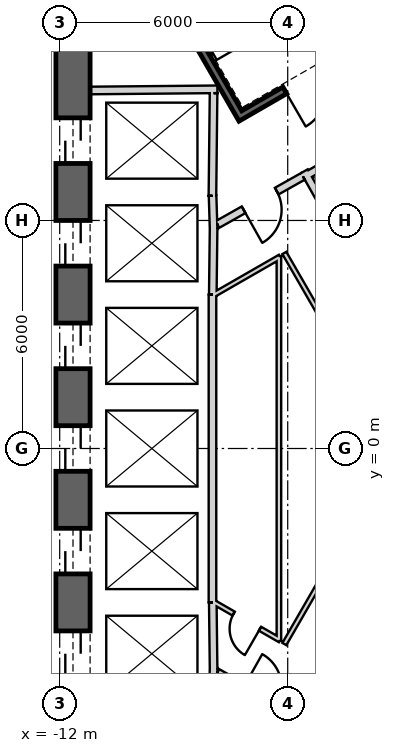
"""IFC4 building model, lengths in metres.
Left out: names, types, materials, properties, quantities, classifications, styles, units other than length and angle.
Written with IfcOpenShell. Run it as: python <this file> out.ifc"""

import sys

from ifc_helpers import new_model, si_unit, direction, frame, frame_2d, origin, place, context, subcontext, project, spatial, rectangle, extrude, element, fill, save


model = new_model("IFC4")
c1 = context("Model", 3, precision=1e-05, world=origin(), true_north=direction((0.0, 1.0)))
c2 = subcontext(c1, "Body", "Model", "MODEL_VIEW")
j1 = project(units=[si_unit("LENGTHUNIT", "METRE"), si_unit("PLANEANGLEUNIT", "RADIAN")], contexts=[c1])
p1 = place(None, origin())
s1 = spatial("IfcSite", under=j1, at=p1, CompositionType="ELEMENT")
p2 = place(p1, origin())
s2 = spatial("IfcBuilding", under=s1, at=p2, CompositionType="ELEMENT")
p3 = place(p2, frame((0.0, 0.0, 82.4)))
s3 = spatial("IfcBuildingStorey", under=s2, at=p3, CompositionType="ELEMENT", Elevation=82.4)
p4 = place(p3, frame((19.475, 2.208, 0.0), z_axis=(0.0, 0.0, 1.0), x_axis=(-0.866028369851, 0.499994862586, 0.0)))
e1 = element("IfcWall", 1, at=p4, inside=s3, PredefinedType="SHEAR", context=c2, shape_type="SweptSolid", body=[
    extrude(rectangle(XDim=31.523, YDim=0.9, at=frame_2d((15.762, 0.0))), origin(), (0.0, 0.0, 1.0), 4.1),
])
p5 = place(p4, frame((7.062, 0.0, 0.0)))
e2 = element("IfcOpeningElement", 2, at=p5, cuts=e1, PredefinedType="OPENING", context=c2, shape_type="SweptSolid", body=[
    extrude(rectangle(XDim=1.2, YDim=2.4, at=frame_2d((0.6, 1.2))), frame((0.0, 0.46, 0.0), z_axis=(0.0, -1.0, 0.0), x_axis=(1.0, 0.0, 0.0)), (0.0, 0.0, 1.0), 0.92),
])
p6 = place(p4, frame((9.762, 0.0, 0.0)))
e3 = element("IfcOpeningElement", 3, at=p6, cuts=e1, PredefinedType="OPENING", context=c2, shape_type="SweptSolid", body=[
    extrude(rectangle(XDim=1.2, YDim=2.4, at=frame_2d((0.6, 1.2))), frame((0.0, 0.46, 0.0), z_axis=(0.0, -1.0, 0.0), x_axis=(1.0, 0.0, 0.0)), (0.0, 0.0, 1.0), 0.92),
])
p7 = place(p4, frame((12.462, 0.0, 0.0)))
e4 = element("IfcOpeningElement", 4, at=p7, cuts=e1, PredefinedType="OPENING", context=c2, shape_type="SweptSolid", body=[
    extrude(rectangle(XDim=1.2, YDim=2.4, at=frame_2d((0.6, 1.2))), frame((0.0, 0.46, 0.0), z_axis=(0.0, -1.0, 0.0), x_axis=(1.0, 0.0, 0.0)), (0.0, 0.0, 1.0), 0.92),
])
p8 = place(p4, frame((15.162, 0.0, 0.0)))
e5 = element("IfcOpeningElement", 5, at=p8, cuts=e1, PredefinedType="OPENING", context=c2, shape_type="SweptSolid", body=[
    extrude(rectangle(XDim=1.2, YDim=2.4, at=frame_2d((0.6, 1.2))), frame((0.0, 0.46, 0.0), z_axis=(0.0, -1.0, 0.0), x_axis=(1.0, 0.0, 0.0)), (0.0, 0.0, 1.0), 0.92),
])
p9 = place(p4, frame((17.862, 0.0, 0.0)))
e6 = element("IfcOpeningElement", 6, at=p9, cuts=e1, PredefinedType="OPENING", context=c2, shape_type="SweptSolid", body=[
    extrude(rectangle(XDim=1.2, YDim=2.4, at=frame_2d((0.6, 1.2))), frame((0.0, 0.46, 0.0), z_axis=(0.0, -1.0, 0.0), x_axis=(1.0, 0.0, 0.0)), (0.0, 0.0, 1.0), 0.92),
])
p10 = place(p4, frame((20.562, 0.0, 0.0)))
e7 = element("IfcOpeningElement", 7, at=p10, cuts=e1, PredefinedType="OPENING", context=c2, shape_type="SweptSolid", body=[
    extrude(rectangle(XDim=1.2, YDim=2.4, at=frame_2d((0.6, 1.2))), frame((0.0, 0.46, 0.0), z_axis=(0.0, -1.0, 0.0), x_axis=(1.0, 0.0, 0.0)), (0.0, 0.0, 1.0), 0.92),
])
p11 = place(p4, frame((23.262, 0.0, 0.0)))
e8 = element("IfcOpeningElement", 8, at=p11, cuts=e1, PredefinedType="OPENING", context=c2, shape_type="SweptSolid", body=[
    extrude(rectangle(XDim=1.2, YDim=2.4, at=frame_2d((0.6, 1.2))), frame((0.0, 0.46, 0.0), z_axis=(0.0, -1.0, 0.0), x_axis=(1.0, 0.0, 0.0)), (0.0, 0.0, 1.0), 0.92),
])
p12 = place(p4, frame((3.612, 0.0, 0.0)))
e9 = element("IfcOpeningElement", 9, at=p12, cuts=e1, PredefinedType="OPENING", context=c2, shape_type="SweptSolid", body=[
    extrude(rectangle(XDim=1.2, YDim=2.4, at=frame_2d((0.6, 1.2))), frame((0.0, 0.46, 0.0), z_axis=(0.0, -1.0, 0.0), x_axis=(1.0, 0.0, 0.0)), (0.0, 0.0, 1.0), 0.92),
])
p13 = place(p4, frame((26.712, 0.0, 0.0)))
e10 = element("IfcOpeningElement", 10, at=p13, cuts=e1, PredefinedType="OPENING", context=c2, shape_type="SweptSolid", body=[
    extrude(rectangle(XDim=1.2, YDim=2.4, at=frame_2d((0.6, 1.2))), frame((0.0, 0.46, 0.0), z_axis=(0.0, -1.0, 0.0), x_axis=(1.0, 0.0, 0.0)), (0.0, 0.0, 1.0), 0.92),
])
p14 = place(p3, frame((-11.65, 15.762, 0.0), z_axis=(0.0, 0.0, 1.0), x_axis=(0.0, -1.0, 0.0)))
e11 = element("IfcWall", 11, at=p14, inside=s3, PredefinedType="SHEAR", context=c2, shape_type="SweptSolid", body=[
    extrude(rectangle(XDim=31.523, YDim=0.9, at=frame_2d((15.762, 0.0))), origin(), (0.0, 0.0, 1.0), 4.1),
])
p15 = place(p14, frame((7.062, 0.0, 0.0)))
e12 = element("IfcOpeningElement", 12, at=p15, cuts=e11, PredefinedType="OPENING", context=c2, shape_type="SweptSolid", body=[
    extrude(rectangle(XDim=1.2, YDim=2.4, at=frame_2d((0.6, 1.2))), frame((0.0, 0.46, 0.0), z_axis=(0.0, -1.0, 0.0), x_axis=(1.0, 0.0, 0.0)), (0.0, 0.0, 1.0), 0.92),
])
p16 = place(p14, frame((9.762, 0.0, 0.0)))
e13 = element("IfcOpeningElement", 13, at=p16, cuts=e11, PredefinedType="OPENING", context=c2, shape_type="SweptSolid", body=[
    extrude(rectangle(XDim=1.2, YDim=2.4, at=frame_2d((0.6, 1.2))), frame((0.0, 0.46, 0.0), z_axis=(0.0, -1.0, 0.0), x_axis=(1.0, 0.0, 0.0)), (0.0, 0.0, 1.0), 0.92),
])
p17 = place(p14, frame((12.462, 0.0, 0.0)))
e14 = element("IfcOpeningElement", 14, at=p17, cuts=e11, PredefinedType="OPENING", context=c2, shape_type="SweptSolid", body=[
    extrude(rectangle(XDim=1.2, YDim=2.4, at=frame_2d((0.6, 1.2))), frame((0.0, 0.46, 0.0), z_axis=(0.0, -1.0, 0.0), x_axis=(1.0, 0.0, 0.0)), (0.0, 0.0, 1.0), 0.92),
])
p18 = place(p14, frame((15.162, 0.0, 0.0)))
e15 = element("IfcOpeningElement", 15, at=p18, cuts=e11, PredefinedType="OPENING", context=c2, shape_type="SweptSolid", body=[
    extrude(rectangle(XDim=1.2, YDim=2.4, at=frame_2d((0.6, 1.2))), frame((0.0, 0.46, 0.0), z_axis=(0.0, -1.0, 0.0), x_axis=(1.0, 0.0, 0.0)), (0.0, 0.0, 1.0), 0.92),
])
p19 = place(p14, frame((17.862, 0.0, 0.0)))
e16 = element("IfcOpeningElement", 16, at=p19, cuts=e11, PredefinedType="OPENING", context=c2, shape_type="SweptSolid", body=[
    extrude(rectangle(XDim=1.2, YDim=2.4, at=frame_2d((0.6, 1.2))), frame((0.0, 0.46, 0.0), z_axis=(0.0, -1.0, 0.0), x_axis=(1.0, 0.0, 0.0)), (0.0, 0.0, 1.0), 0.92),
])
p20 = place(p14, frame((20.562, 0.0, 0.0)))
e17 = element("IfcOpeningElement", 17, at=p20, cuts=e11, PredefinedType="OPENING", context=c2, shape_type="SweptSolid", body=[
    extrude(rectangle(XDim=1.2, YDim=2.4, at=frame_2d((0.6, 1.2))), frame((0.0, 0.46, 0.0), z_axis=(0.0, -1.0, 0.0), x_axis=(1.0, 0.0, 0.0)), (0.0, 0.0, 1.0), 0.92),
])
p21 = place(p14, frame((23.262, 0.0, 0.0)))
e18 = element("IfcOpeningElement", 18, at=p21, cuts=e11, PredefinedType="OPENING", context=c2, shape_type="SweptSolid", body=[
    extrude(rectangle(XDim=1.2, YDim=2.4, at=frame_2d((0.6, 1.2))), frame((0.0, 0.46, 0.0), z_axis=(0.0, -1.0, 0.0), x_axis=(1.0, 0.0, 0.0)), (0.0, 0.0, 1.0), 0.92),
])
p22 = place(p14, frame((3.612, 0.0, 0.0)))
e19 = element("IfcOpeningElement", 19, at=p22, cuts=e11, PredefinedType="OPENING", context=c2, shape_type="SweptSolid", body=[
    extrude(rectangle(XDim=1.2, YDim=2.4, at=frame_2d((0.6, 1.2))), frame((0.0, 0.46, 0.0), z_axis=(0.0, -1.0, 0.0), x_axis=(1.0, 0.0, 0.0)), (0.0, 0.0, 1.0), 0.92),
])
p23 = place(p14, frame((26.712, 0.0, 0.0)))
e20 = element("IfcOpeningElement", 20, at=p23, cuts=e11, PredefinedType="OPENING", context=c2, shape_type="SweptSolid", body=[
    extrude(rectangle(XDim=1.2, YDim=2.4, at=frame_2d((0.6, 1.2))), frame((0.0, 0.46, 0.0), z_axis=(0.0, -1.0, 0.0), x_axis=(1.0, 0.0, 0.0)), (0.0, 0.0, 1.0), 0.92),
])
p24 = place(p3, frame((-7.825, -17.97, 0.0), z_axis=(0.0, 0.0, 1.0), x_axis=(0.866028369851, 0.499994862586, 0.0)))
e21 = element("IfcWall", 21, at=p24, inside=s3, PredefinedType="SHEAR", context=c2, shape_type="SweptSolid", body=[
    extrude(rectangle(XDim=31.523, YDim=0.9, at=frame_2d((15.762, 0.0))), origin(), (0.0, 0.0, 1.0), 4.1),
])
p25 = place(p24, frame((7.062, 0.0, 0.0)))
e22 = element("IfcOpeningElement", 22, at=p25, cuts=e21, PredefinedType="OPENING", context=c2, shape_type="SweptSolid", body=[
    extrude(rectangle(XDim=1.2, YDim=2.4, at=frame_2d((0.6, 1.2))), frame((0.0, 0.46, 0.0), z_axis=(0.0, -1.0, 0.0), x_axis=(1.0, 0.0, 0.0)), (0.0, 0.0, 1.0), 0.92),
])
p26 = place(p24, frame((9.762, 0.0, 0.0)))
e23 = element("IfcOpeningElement", 23, at=p26, cuts=e21, PredefinedType="OPENING", context=c2, shape_type="SweptSolid", body=[
    extrude(rectangle(XDim=1.2, YDim=2.4, at=frame_2d((0.6, 1.2))), frame((0.0, 0.46, 0.0), z_axis=(0.0, -1.0, 0.0), x_axis=(1.0, 0.0, 0.0)), (0.0, 0.0, 1.0), 0.92),
])
p27 = place(p24, frame((12.462, 0.0, 0.0)))
e24 = element("IfcOpeningElement", 24, at=p27, cuts=e21, PredefinedType="OPENING", context=c2, shape_type="SweptSolid", body=[
    extrude(rectangle(XDim=1.2, YDim=2.4, at=frame_2d((0.6, 1.2))), frame((0.0, 0.46, 0.0), z_axis=(0.0, -1.0, 0.0), x_axis=(1.0, 0.0, 0.0)), (0.0, 0.0, 1.0), 0.92),
])
p28 = place(p24, frame((15.162, 0.0, 0.0)))
e25 = element("IfcOpeningElement", 25, at=p28, cuts=e21, PredefinedType="OPENING", context=c2, shape_type="SweptSolid", body=[
    extrude(rectangle(XDim=1.2, YDim=2.4, at=frame_2d((0.6, 1.2))), frame((0.0, 0.46, 0.0), z_axis=(0.0, -1.0, 0.0), x_axis=(1.0, 0.0, 0.0)), (0.0, 0.0, 1.0), 0.92),
])
p29 = place(p24, frame((17.862, 0.0, 0.0)))
e26 = element("IfcOpeningElement", 26, at=p29, cuts=e21, PredefinedType="OPENING", context=c2, shape_type="SweptSolid", body=[
    extrude(rectangle(XDim=1.2, YDim=2.4, at=frame_2d((0.6, 1.2))), frame((0.0, 0.46, 0.0), z_axis=(0.0, -1.0, 0.0), x_axis=(1.0, 0.0, 0.0)), (0.0, 0.0, 1.0), 0.92),
])
p30 = place(p24, frame((20.562, 0.0, 0.0)))
e27 = element("IfcOpeningElement", 27, at=p30, cuts=e21, PredefinedType="OPENING", context=c2, shape_type="SweptSolid", body=[
    extrude(rectangle(XDim=1.2, YDim=2.4, at=frame_2d((0.6, 1.2))), frame((0.0, 0.46, 0.0), z_axis=(0.0, -1.0, 0.0), x_axis=(1.0, 0.0, 0.0)), (0.0, 0.0, 1.0), 0.92),
])
p31 = place(p24, frame((26.712, 0.0, 0.0)))
e28 = element("IfcOpeningElement", 28, at=p31, cuts=e21, PredefinedType="OPENING", context=c2, shape_type="SweptSolid", body=[
    extrude(rectangle(XDim=1.2, YDim=2.4, at=frame_2d((0.6, 1.2))), frame((0.0, 0.46, 0.0), z_axis=(0.0, -1.0, 0.0), x_axis=(1.0, 0.0, 0.0)), (0.0, 0.0, 1.0), 0.92),
])
p32 = place(p24, frame((3.612, 0.0, 0.0)))
e29 = element("IfcOpeningElement", 29, at=p32, cuts=e21, PredefinedType="OPENING", context=c2, shape_type="SweptSolid", body=[
    extrude(rectangle(XDim=1.2, YDim=2.4, at=frame_2d((0.6, 1.2))), frame((0.0, 0.46, 0.0), z_axis=(0.0, -1.0, 0.0), x_axis=(1.0, 0.0, 0.0)), (0.0, 0.0, 1.0), 0.92),
])
p33 = place(p3, frame((-11.2, 9.42, 0.0), z_axis=(0.0, 0.0, 1.0), x_axis=(0.999957167047, 0.009255488683, 0.0)))
e30 = element("IfcWall", 30, at=p33, inside=s3, PredefinedType="PLUMBINGWALL", context=c2, shape_type="SweptSolid", body=[
    extrude(rectangle(XDim=3.35, YDim=0.2, at=frame_2d((1.675, 0.0))), origin(), (0.0, 0.0, 1.0), 3.8),
])
p34 = place(p3, frame((-7.951, 9.35, 0.0), z_axis=(0.0, 0.0, 1.0), x_axis=(-0.011120469654, -0.999938165666, 0.0)))
e31 = element("IfcWall", 31, at=p34, inside=s3, PredefinedType="PLUMBINGWALL", context=c2, shape_type="SweptSolid", body=[
    extrude(rectangle(XDim=2.7, YDim=0.2, at=frame_2d((1.35, 0.0))), origin(), (0.0, 0.0, 1.0), 3.8),
])
p35 = place(p3, frame((-7.977, 6.65, 0.0), z_axis=(0.0, 0.0, 1.0), x_axis=(0.030861509705, -0.999523670164, 0.0)))
e32 = element("IfcWall", 32, at=p35, inside=s3, PredefinedType="PLUMBINGWALL", context=c2, shape_type="SweptSolid", body=[
    extrude(rectangle(XDim=0.878, YDim=0.2, at=frame_2d((0.439, 0.0))), origin(), (0.0, 0.0, 1.0), 3.8),
])
p36 = place(p3, frame((-7.949, 5.895, 0.0), z_axis=(0.0, 0.0, 1.0), x_axis=(-0.012042535896, -0.999927486035, 0.0)))
e33 = element("IfcWall", 33, at=p36, inside=s3, PredefinedType="PLUMBINGWALL", context=c2, shape_type="SweptSolid", body=[
    extrude(rectangle(XDim=1.845, YDim=0.2, at=frame_2d((0.922, 0.0))), origin(), (0.0, 0.0, 1.0), 3.8),
])
p37 = place(p3, frame((-7.98, 4.05, 0.0), z_axis=(0.0, 0.0, 1.0), x_axis=(0.0, -1.0, 0.0)))
e34 = element("IfcWall", 34, at=p37, inside=s3, PredefinedType="PLUMBINGWALL", context=c2, shape_type="SweptSolid", body=[
    extrude(rectangle(XDim=8.1, YDim=0.2, at=frame_2d((4.05, 0.0))), origin(), (0.0, 0.0, 1.0), 3.8),
])
p38 = place(p3, frame((-7.95, -5.772, 0.0), z_axis=(0.0, 0.0, 1.0), x_axis=(-0.030803413295, -0.999525462272, 0.0)))
e35 = element("IfcWall", 35, at=p38, inside=s3, PredefinedType="PLUMBINGWALL", context=c2, shape_type="SweptSolid", body=[
    extrude(rectangle(XDim=1.078, YDim=0.2, at=frame_2d((0.539, 0.0))), origin(), (0.0, 0.0, 1.0), 3.8),
])
p39 = place(p3, frame((-7.971, -4.05, 0.0), z_axis=(0.0, 0.0, 1.0), x_axis=(0.012042535896, -0.999927486035, 0.0)))
e36 = element("IfcWall", 36, at=p39, inside=s3, PredefinedType="PLUMBINGWALL", context=c2, shape_type="SweptSolid", body=[
    extrude(rectangle(XDim=1.845, YDim=0.2, at=frame_2d((0.922, 0.0))), origin(), (0.0, 0.0, 1.0), 3.8),
])
p40 = place(p3, frame((-11.245, 15.678, -0.3), z_axis=(0.0, 0.0, 1.0), x_axis=(0.499977274689, -0.866038523851, 0.0)))
e37 = element("IfcWall", 37, at=p40, inside=s3, PredefinedType="SHEAR", context=c2, shape_type="SweptSolid", body=[
    extrude(rectangle(XDim=8.1, YDim=0.2, at=frame_2d((4.05, 0.0))), origin(), (0.0, 0.0, 1.0), 4.1),
])
p41 = place(p3, frame((-7.159, 8.8, -0.3), z_axis=(0.0, 0.0, 1.0), x_axis=(0.866047807691, 0.499961193289, 0.0)))
e38 = element("IfcWall", 38, at=p41, inside=s3, PredefinedType="SHEAR", context=c2, shape_type="SweptSolid", body=[
    extrude(rectangle(XDim=3.6, YDim=0.2, at=frame_2d((1.8, 0.0))), origin(), (0.0, 0.0, 1.0), 4.1),
])
p42 = place(p41, frame((1.25, 0.0, 0.3)))
e39 = element("IfcOpeningElement", 39, at=p42, cuts=e38, PredefinedType="OPENING", context=c2, shape_type="SweptSolid", body=[
    extrude(rectangle(XDim=1.1, YDim=2.1, at=frame_2d((0.55, 1.05))), frame((0.0, 0.11, 0.0), z_axis=(0.0, -1.0, 0.0), x_axis=(1.0, 0.0, 0.0)), (0.0, 0.0, 1.0), 0.22),
])
p43 = place(p3, frame((-5.524, 7.168, 0.0), z_axis=(0.0, 0.0, 1.0), x_axis=(0.866024647952, 0.500001309137, 0.0)))
e40 = element("IfcWall", 40, at=p43, inside=s3, PredefinedType="PLUMBINGWALL", context=c2, shape_type="SweptSolid", body=[
    extrude(rectangle(XDim=2.4, YDim=0.2, at=frame_2d((1.2, 0.0))), origin(), (0.0, 0.0, 1.0), 3.8),
])
p44 = place(p43, frame((0.6, 0.0, 0.0)))
e41 = element("IfcOpeningElement", 41, at=p44, cuts=e40, PredefinedType="OPENING", context=c2, shape_type="SweptSolid", body=[
    extrude(rectangle(XDim=1.2, YDim=2.4, at=frame_2d((0.6, 1.2))), frame((0.0, 0.11, 0.0), z_axis=(0.0, -1.0, 0.0), x_axis=(1.0, 0.0, 0.0)), (0.0, 0.0, 1.0), 0.22),
])
p45 = place(p3, frame((-5.562, 7.296, 0.0), z_axis=(0.0, 0.0, 1.0), x_axis=(0.49134651263, -0.870964180966, 0.0)))
e42 = element("IfcWall", 42, at=p45, inside=s3, PredefinedType="PLUMBINGWALL", context=c2, shape_type="SweptSolid", body=[
    extrude(rectangle(XDim=3.0, YDim=0.2, at=frame_2d((1.5, 0.0))), origin(), (0.0, 0.0, 1.0), 3.8),
])
p46 = place(p3, frame((-3.99, -4.509, 0.0), z_axis=(0.0, 0.0, 1.0), x_axis=(-0.491358283181, -0.870957540612, 0.0)))
e43 = element("IfcWall", 43, at=p46, inside=s3, PredefinedType="PLUMBINGWALL", context=c2, shape_type="SweptSolid", body=[
    extrude(rectangle(XDim=3.2, YDim=0.2, at=frame_2d((1.6, 0.0))), origin(), (0.0, 0.0, 1.0), 3.8),
])
p47 = place(p3, frame((-5.6, 7.16, 0.0), z_axis=(0.0, 0.0, 1.0), x_axis=(-0.871363259478, -0.490638431059, 0.0)))
e44 = element("IfcWall", 44, at=p47, inside=s3, PredefinedType="PARTITIONING", context=c2, shape_type="SweptSolid", body=[
    extrude(rectangle(XDim=2.581, YDim=0.2, at=frame_2d((1.291, 0.0))), origin(), (0.0, 0.0, 1.0), 3.8),
])
p48 = place(p47, frame((0.791, 0.0, 0.0)))
e45 = element("IfcOpeningElement", 45, at=p48, cuts=e44, PredefinedType="OPENING", context=c2, shape_type="SweptSolid", body=[
    extrude(rectangle(XDim=1.0, YDim=2.1, at=frame_2d((0.5, 1.05))), frame((0.0, 0.11, 0.0), z_axis=(0.0, -1.0, 0.0), x_axis=(1.0, 0.0, 0.0)), (0.0, 0.0, 1.0), 0.22),
])
p49 = place(p3, frame((-7.849, -5.894, 0.0), z_axis=(0.0, 0.0, 1.0), x_axis=(0.871363259478, -0.490638431059, 0.0)))
e46 = element("IfcWall", 46, at=p49, inside=s3, PredefinedType="PARTITIONING", context=c2, shape_type="SweptSolid", body=[
    extrude(rectangle(XDim=2.581, YDim=0.2, at=frame_2d((1.291, 0.0))), origin(), (0.0, 0.0, 1.0), 3.8),
])
p50 = place(p49, frame((0.791, 0.0, 0.0)))
e47 = element("IfcOpeningElement", 47, at=p50, cuts=e46, PredefinedType="OPENING", context=c2, shape_type="SweptSolid", body=[
    extrude(rectangle(XDim=1.0, YDim=2.1, at=frame_2d((0.5, 1.05))), frame((0.0, 0.11, 0.0), z_axis=(0.0, -1.0, 0.0), x_axis=(1.0, 0.0, 0.0)), (0.0, 0.0, 1.0), 0.22),
])
p51 = place(p3, frame((-6.231, 5.062, 0.0), z_axis=(0.0, 0.0, 1.0), x_axis=(0.0, -1.0, 0.0)))
e48 = element("IfcWall", 48, at=p51, inside=s3, PredefinedType="PARTITIONING", context=c2, shape_type="SweptSolid", body=[
    extrude(rectangle(XDim=10.125, YDim=0.12, at=frame_2d((5.062, 0.0))), origin(), (0.0, 0.0, 1.0), 3.8),
])
p52 = place(p3, frame((-7.95, -4.041, 0.0), z_axis=(0.0, 0.0, 1.0), x_axis=(0.867071050325, -0.498184497639, 0.0)))
e49 = element("IfcWall", 49, at=p52, inside=s3, PredefinedType="PARTITIONING", context=c2, shape_type="SweptSolid", body=[
    extrude(rectangle(XDim=2.017, YDim=0.12, at=frame_2d((1.008, 0.0))), origin(), (0.0, 0.0, 1.0), 3.8),
])
p53 = place(p52, frame((0.608, 0.0, 0.0)))
e50 = element("IfcOpeningElement", 50, at=p53, cuts=e49, PredefinedType="OPENING", context=c2, shape_type="SweptSolid", body=[
    extrude(rectangle(XDim=0.8, YDim=2.1, at=frame_2d((0.4, 1.05))), frame((0.0, 0.07, 0.0), z_axis=(0.0, -1.0, 0.0), x_axis=(1.0, 0.0, 0.0)), (0.0, 0.0, 1.0), 0.14),
])
p54 = place(p3, frame((-6.201, 5.046, 0.0), z_axis=(0.0, 0.0, 1.0), x_axis=(-0.867071050325, -0.498184497639, 0.0)))
e51 = element("IfcWall", 51, at=p54, inside=s3, PredefinedType="PARTITIONING", context=c2, shape_type="SweptSolid", body=[
    extrude(rectangle(XDim=2.017, YDim=0.12, at=frame_2d((1.008, 0.0))), origin(), (0.0, 0.0, 1.0), 3.8),
])
p55 = place(p3, frame((-4.558, 2.495, 0.0), z_axis=(0.0, 0.0, 1.0), x_axis=(-0.499991792115, 0.866030142557, 0.0)))
e52 = element("IfcWall", 52, at=p55, inside=s3, PredefinedType="PARTITIONING", context=c2, shape_type="SweptSolid", body=[
    extrude(rectangle(XDim=3.06, YDim=0.12, at=frame_2d((1.53, 0.0))), origin(), (0.0, 0.0, 1.0), 3.8),
])
p56 = place(p3, frame((-6.088, -5.145, 0.0), z_axis=(0.0, 0.0, 1.0), x_axis=(0.500050696077, 0.865996132412, 0.0)))
e53 = element("IfcWall", 53, at=p56, inside=s3, PredefinedType="PARTITIONING", context=c2, shape_type="SweptSolid", body=[
    extrude(rectangle(XDim=2.94, YDim=0.12, at=frame_2d((1.47, 0.0))), origin(), (0.0, 0.0, 1.0), 3.8),
])
p57 = place(p3, frame((21.944, 4.998, 0.0), z_axis=(0.0, 0.0, 1.0), x_axis=(-0.866025615729, 0.499999632902, 0.0)))
e54 = element("IfcWall", 54, at=p57, inside=s3, PredefinedType="PARTITIONING", context=c2, shape_type="SweptSolid", body=[
    extrude(rectangle(XDim=32.811, YDim=0.2, at=frame_2d((16.405, 0.0))), origin(), (0.0, 0.0, 1.0), 2.98),
])
p58 = place(p57, frame((15.955, 0.0, 0.0)))
e55 = element("IfcOpeningElement", 55, at=p58, cuts=e54, PredefinedType="OPENING", context=c2, shape_type="SweptSolid", body=[
    extrude(rectangle(XDim=1.0, YDim=2.1, at=frame_2d((0.5, 1.05))), frame((0.0, 0.11, 0.0), z_axis=(0.0, -1.0, 0.0), x_axis=(1.0, 0.0, 0.0)), (0.0, 0.0, 1.0), 0.22),
])
p59 = place(p42, origin())
e56 = element("IfcDoor", 56, at=p59, inside=s3, OperationType="SINGLE_SWING_RIGHT", PredefinedType="USERDEFINED", context=c2, shape_type="SweptSolid", body=[
    extrude(rectangle(XDim=1.1, YDim=2.1, at=frame_2d((0.55, 1.05))), frame((0.0, 0.025, 0.0), z_axis=(0.0, -1.0, 0.0), x_axis=(1.0, 0.0, 0.0)), (0.0, 0.0, 1.0), 0.05),
])
fill(e39, e56)
p60 = place(p48, origin())
e57 = element("IfcDoor", 57, at=p60, inside=s3, OperationType="SINGLE_SWING_LEFT", PredefinedType="USERDEFINED", context=c2, shape_type="SweptSolid", body=[
    extrude(rectangle(XDim=1.0, YDim=2.1, at=frame_2d((0.5, 1.05))), frame((0.0, 0.025, 0.0), z_axis=(0.0, -1.0, 0.0), x_axis=(1.0, 0.0, 0.0)), (0.0, 0.0, 1.0), 0.05),
])
fill(e45, e57)
p61 = place(p53, origin())
e58 = element("IfcDoor", 58, at=p61, inside=s3, OperationType="SINGLE_SWING_RIGHT", PredefinedType="USERDEFINED", context=c2, shape_type="SweptSolid", body=[
    extrude(rectangle(XDim=0.8, YDim=2.1, at=frame_2d((0.4, 1.05))), frame((0.0, 0.025, 0.0), z_axis=(0.0, -1.0, 0.0), x_axis=(1.0, 0.0, 0.0)), (0.0, 0.0, 1.0), 0.05),
])
fill(e50, e58)
p62 = place(p15, origin())
e59 = element("IfcDoor", 59, at=p62, inside=s3, OperationType="SLIDING_TO_LEFT", PredefinedType="USERDEFINED", context=c2, shape_type="SweptSolid", body=[
    extrude(rectangle(XDim=1.2, YDim=2.4, at=frame_2d((0.6, 1.2))), frame((0.0, 0.025, 0.0), z_axis=(0.0, -1.0, 0.0), x_axis=(1.0, 0.0, 0.0)), (0.0, 0.0, 1.0), 0.05),
])
fill(e12, e59)
p63 = place(p16, origin())
e60 = element("IfcDoor", 60, at=p63, inside=s3, OperationType="SLIDING_TO_LEFT", PredefinedType="USERDEFINED", context=c2, shape_type="SweptSolid", body=[
    extrude(rectangle(XDim=1.2, YDim=2.4, at=frame_2d((0.6, 1.2))), frame((0.0, 0.025, 0.0), z_axis=(0.0, -1.0, 0.0), x_axis=(1.0, 0.0, 0.0)), (0.0, 0.0, 1.0), 0.05),
])
fill(e13, e60)
p64 = place(p17, origin())
e61 = element("IfcDoor", 61, at=p64, inside=s3, OperationType="SLIDING_TO_LEFT", PredefinedType="USERDEFINED", context=c2, shape_type="SweptSolid", body=[
    extrude(rectangle(XDim=1.2, YDim=2.4, at=frame_2d((0.6, 1.2))), frame((0.0, 0.025, 0.0), z_axis=(0.0, -1.0, 0.0), x_axis=(1.0, 0.0, 0.0)), (0.0, 0.0, 1.0), 0.05),
])
fill(e14, e61)
p65 = place(p18, origin())
e62 = element("IfcDoor", 62, at=p65, inside=s3, OperationType="SLIDING_TO_LEFT", PredefinedType="USERDEFINED", context=c2, shape_type="SweptSolid", body=[
    extrude(rectangle(XDim=1.2, YDim=2.4, at=frame_2d((0.6, 1.2))), frame((0.0, 0.025, 0.0), z_axis=(0.0, -1.0, 0.0), x_axis=(1.0, 0.0, 0.0)), (0.0, 0.0, 1.0), 0.05),
])
fill(e15, e62)
p66 = place(p19, origin())
e63 = element("IfcDoor", 63, at=p66, inside=s3, OperationType="SLIDING_TO_LEFT", PredefinedType="USERDEFINED", context=c2, shape_type="SweptSolid", body=[
    extrude(rectangle(XDim=1.2, YDim=2.4, at=frame_2d((0.6, 1.2))), frame((0.0, 0.025, 0.0), z_axis=(0.0, -1.0, 0.0), x_axis=(1.0, 0.0, 0.0)), (0.0, 0.0, 1.0), 0.05),
])
fill(e16, e63)
p67 = place(p20, origin())
e64 = element("IfcDoor", 64, at=p67, inside=s3, OperationType="SLIDING_TO_LEFT", PredefinedType="USERDEFINED", context=c2, shape_type="SweptSolid", body=[
    extrude(rectangle(XDim=1.2, YDim=2.4, at=frame_2d((0.6, 1.2))), frame((0.0, 0.025, 0.0), z_axis=(0.0, -1.0, 0.0), x_axis=(1.0, 0.0, 0.0)), (0.0, 0.0, 1.0), 0.05),
])
fill(e17, e64)
save(model, sys.argv[1])
